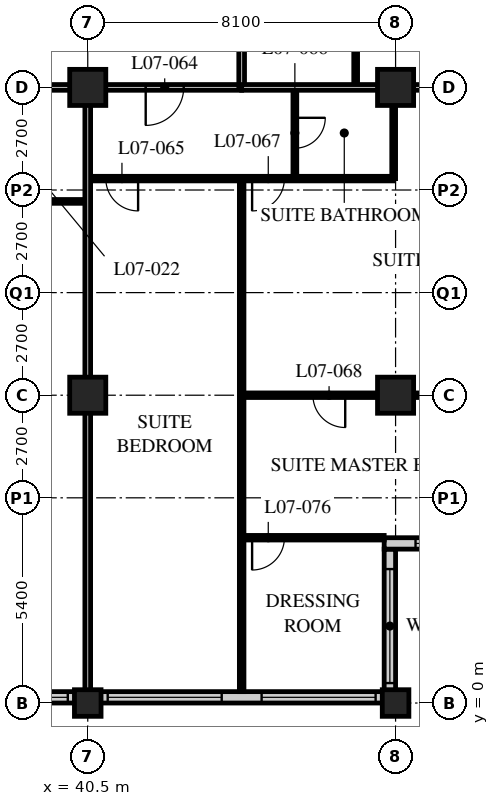
"""IFC4 building model, lengths in metres.
Left out: names, types, materials, properties, quantities, classifications, styles, units other than length and angle.
Written with IfcOpenShell. Run it as: python <this file> out.ifc"""

import sys

from ifc_helpers import new_model, si_unit, direction, frame, frame_2d, origin, origin_2d, place, context, subcontext, project, spatial, rectangle, hollow_rectangle, extrude, element, fill, save


model = new_model("IFC4")
c1 = context("Model", 3, precision=1e-05, world=origin(), true_north=direction((0.0, 1.0)))
c2 = subcontext(c1, "Body", "Model", "MODEL_VIEW")
j1 = project(units=[si_unit("LENGTHUNIT", "METRE"), si_unit("PLANEANGLEUNIT", "RADIAN")], contexts=[c1])
p1 = place(None, origin())
s1 = spatial("IfcSite", under=j1, at=p1, CompositionType="ELEMENT")
p2 = place(p1, origin())
s2 = spatial("IfcBuilding", under=s1, at=p2, CompositionType="ELEMENT")
p3 = place(p2, frame((0.0, 0.0, 36.4)))
s3 = spatial("IfcBuildingStorey", under=s2, at=p3, CompositionType="ELEMENT", Elevation=36.4)
p4 = place(p3, frame((40.5, 0.0, 0.0), z_axis=(0.0, 0.0, 1.0), x_axis=(1.0, 0.0, 0.0)))
e1 = element("IfcColumn", 1, at=p4, inside=s3, PredefinedType="COLUMN", context=c2, shape_type="SweptSolid", body=[
    extrude(hollow_rectangle(XDim=0.7, YDim=0.7, WallThickness=0.06, at=origin_2d()), origin(), (0.0, 0.0, 1.0), 3.4),
])
for number, where, z_axis, x_axis in (
    (2, (40.5, 8.1, 0.0), (0.0, 0.0, 1.0), (1.0, 0.0, 0.0)),
    (3, (40.5, 16.2, 0.0), (0.0, 0.0, 1.0), (1.0, 0.0, 0.0)),
):
    element("IfcColumn", number, at=place(p3, frame(where, z_axis=z_axis, x_axis=x_axis)), inside=s3, PredefinedType="COLUMN", context=c2, shape_type="SweptSolid", body=[
        extrude(hollow_rectangle(XDim=0.95, YDim=0.95, WallThickness=0.095, at=origin_2d()), origin(), (0.0, 0.0, 1.0), 3.4),
    ])
p5 = place(p3, frame((48.6, 0.0, 0.0), z_axis=(0.0, 0.0, 1.0), x_axis=(1.0, 0.0, 0.0)))
e4 = element("IfcColumn", 4, at=p5, inside=s3, PredefinedType="COLUMN", context=c2, shape_type="SweptSolid", body=[
    extrude(hollow_rectangle(XDim=0.7, YDim=0.7, WallThickness=0.06, at=origin_2d()), origin(), (0.0, 0.0, 1.0), 3.4),
])
for number, where, z_axis, x_axis in (
    (5, (48.6, 8.1, 0.0), (0.0, 0.0, 1.0), (1.0, 0.0, 0.0)),
    (6, (48.6, 16.2, 0.0), (0.0, 0.0, 1.0), (1.0, 0.0, 0.0)),
):
    element("IfcColumn", number, at=place(p3, frame(where, z_axis=z_axis, x_axis=x_axis)), inside=s3, PredefinedType="COLUMN", context=c2, shape_type="SweptSolid", body=[
        extrude(hollow_rectangle(XDim=0.95, YDim=0.95, WallThickness=0.095, at=origin_2d()), origin(), (0.0, 0.0, 1.0), 3.4),
    ])
p6 = place(p3, frame((8.4, 0.15, 0.0), z_axis=(0.0, 0.0, 1.0), x_axis=(1.0, 0.0, 0.0)))
e7 = element("IfcWall", 7, at=p6, inside=s3, PredefinedType="SOLIDWALL", context=c2, shape_type="SweptSolid", body=[
    extrude(rectangle(XDim=40.2, YDim=0.3, at=frame_2d((20.1, 0.0))), origin(), (0.0, 0.0, 1.0), 3.19),
])
p7 = place(p6, frame((0.225, 0.0, 0.9)))
e8 = element("IfcOpeningElement", 8, at=p7, cuts=e7, PredefinedType="OPENING", context=c2, shape_type="SweptSolid", body=[
    extrude(rectangle(XDim=3.0, YDim=2.0, at=frame_2d((1.5, 1.0))), frame((0.0, 0.16, 0.0), z_axis=(0.0, -1.0, 0.0), x_axis=(1.0, 0.0, 0.0)), (0.0, 0.0, 1.0), 0.32),
])
p8 = place(p6, frame((4.275, 0.0, 0.9)))
e9 = element("IfcOpeningElement", 9, at=p8, cuts=e7, PredefinedType="OPENING", context=c2, shape_type="SweptSolid", body=[
    extrude(rectangle(XDim=3.0, YDim=2.0, at=frame_2d((1.5, 1.0))), frame((0.0, 0.16, 0.0), z_axis=(0.0, -1.0, 0.0), x_axis=(1.0, 0.0, 0.0)), (0.0, 0.0, 1.0), 0.32),
])
p9 = place(p6, frame((8.325, 0.0, 0.9)))
e10 = element("IfcOpeningElement", 10, at=p9, cuts=e7, PredefinedType="OPENING", context=c2, shape_type="SweptSolid", body=[
    extrude(rectangle(XDim=3.0, YDim=2.0, at=frame_2d((1.5, 1.0))), frame((0.0, 0.16, 0.0), z_axis=(0.0, -1.0, 0.0), x_axis=(1.0, 0.0, 0.0)), (0.0, 0.0, 1.0), 0.32),
])
p10 = place(p6, frame((12.375, 0.0, 0.9)))
e11 = element("IfcOpeningElement", 11, at=p10, cuts=e7, PredefinedType="OPENING", context=c2, shape_type="SweptSolid", body=[
    extrude(rectangle(XDim=3.0, YDim=2.0, at=frame_2d((1.5, 1.0))), frame((0.0, 0.16, 0.0), z_axis=(0.0, -1.0, 0.0), x_axis=(1.0, 0.0, 0.0)), (0.0, 0.0, 1.0), 0.32),
])
p11 = place(p6, frame((16.425, 0.0, 0.9)))
e12 = element("IfcOpeningElement", 12, at=p11, cuts=e7, PredefinedType="OPENING", context=c2, shape_type="SweptSolid", body=[
    extrude(rectangle(XDim=3.0, YDim=2.0, at=frame_2d((1.5, 1.0))), frame((0.0, 0.16, 0.0), z_axis=(0.0, -1.0, 0.0), x_axis=(1.0, 0.0, 0.0)), (0.0, 0.0, 1.0), 0.32),
])
p12 = place(p6, frame((20.475, 0.0, 0.9)))
e13 = element("IfcOpeningElement", 13, at=p12, cuts=e7, PredefinedType="OPENING", context=c2, shape_type="SweptSolid", body=[
    extrude(rectangle(XDim=3.0, YDim=2.0, at=frame_2d((1.5, 1.0))), frame((0.0, 0.16, 0.0), z_axis=(0.0, -1.0, 0.0), x_axis=(1.0, 0.0, 0.0)), (0.0, 0.0, 1.0), 0.32),
])
p13 = place(p6, frame((24.525, 0.0, 0.9)))
e14 = element("IfcOpeningElement", 14, at=p13, cuts=e7, PredefinedType="OPENING", context=c2, shape_type="SweptSolid", body=[
    extrude(rectangle(XDim=3.0, YDim=2.0, at=frame_2d((1.5, 1.0))), frame((0.0, 0.16, 0.0), z_axis=(0.0, -1.0, 0.0), x_axis=(1.0, 0.0, 0.0)), (0.0, 0.0, 1.0), 0.32),
])
p14 = place(p6, frame((28.575, 0.0, 0.9)))
e15 = element("IfcOpeningElement", 15, at=p14, cuts=e7, PredefinedType="OPENING", context=c2, shape_type="SweptSolid", body=[
    extrude(rectangle(XDim=3.0, YDim=2.0, at=frame_2d((1.5, 1.0))), frame((0.0, 0.16, 0.0), z_axis=(0.0, -1.0, 0.0), x_axis=(1.0, 0.0, 0.0)), (0.0, 0.0, 1.0), 0.32),
])
p15 = place(p6, frame((32.625, 0.0, 0.9)))
e16 = element("IfcOpeningElement", 16, at=p15, cuts=e7, PredefinedType="OPENING", context=c2, shape_type="SweptSolid", body=[
    extrude(rectangle(XDim=3.0, YDim=2.0, at=frame_2d((1.5, 1.0))), frame((0.0, 0.16, 0.0), z_axis=(0.0, -1.0, 0.0), x_axis=(1.0, 0.0, 0.0)), (0.0, 0.0, 1.0), 0.32),
])
p16 = place(p6, frame((36.675, 0.0, 0.9)))
e17 = element("IfcOpeningElement", 17, at=p16, cuts=e7, PredefinedType="OPENING", context=c2, shape_type="SweptSolid", body=[
    extrude(rectangle(XDim=3.0, YDim=2.0, at=frame_2d((1.5, 1.0))), frame((0.0, 0.16, 0.0), z_axis=(0.0, -1.0, 0.0), x_axis=(1.0, 0.0, 0.0)), (0.0, 0.0, 1.0), 0.32),
])
p17 = place(p3, frame((48.45, 0.3, 0.0), z_axis=(0.0, 0.0, 1.0), x_axis=(0.0, 1.0, 0.0)))
e18 = element("IfcWall", 18, at=p17, inside=s3, PredefinedType="SOLIDWALL", context=c2, shape_type="SweptSolid", body=[
    extrude(rectangle(XDim=3.75, YDim=0.3, at=frame_2d((1.875, 0.0))), origin(), (0.0, 0.0, 1.0), 3.19),
])
p18 = place(p17, frame((0.225, 0.0, 0.9)))
e19 = element("IfcOpeningElement", 19, at=p18, cuts=e18, PredefinedType="OPENING", context=c2, shape_type="SweptSolid", body=[
    extrude(rectangle(XDim=3.0, YDim=1.5, at=frame_2d((1.5, 0.75))), frame((0.0, 0.16, 0.0), z_axis=(0.0, -1.0, 0.0), x_axis=(1.0, 0.0, 0.0)), (0.0, 0.0, 1.0), 0.32),
])
p19 = place(p3, frame((48.3, 4.2, 0.0), z_axis=(0.0, 0.0, 1.0), x_axis=(1.0, 0.0, 0.0)))
e20 = element("IfcWall", 20, at=p19, inside=s3, PredefinedType="SOLIDWALL", context=c2, shape_type="SweptSolid", body=[
    extrude(rectangle(XDim=4.35, YDim=0.3, at=frame_2d((2.175, 0.0))), origin(), (0.0, 0.0, 1.0), 3.19),
])
p20 = place(p19, frame((0.825, 0.0, 0.9)))
e21 = element("IfcOpeningElement", 21, at=p20, cuts=e20, PredefinedType="OPENING", context=c2, shape_type="SweptSolid", body=[
    extrude(rectangle(XDim=3.0, YDim=1.5, at=frame_2d((1.5, 0.75))), frame((0.0, 0.16, 0.0), z_axis=(0.0, -1.0, 0.0), x_axis=(1.0, 0.0, 0.0)), (0.0, 0.0, 1.0), 0.32),
])
p21 = place(p3, frame((12.15, 16.2, 0.0), z_axis=(0.0, 0.0, 1.0), x_axis=(1.0, 0.0, 0.0)))
e22 = element("IfcWall", 22, at=p21, inside=s3, PredefinedType="PARTITIONING", context=c2, shape_type="SweptSolid", body=[
    extrude(rectangle(XDim=32.4, YDim=0.15, at=frame_2d((16.2, 0.0))), origin(), (0.0, 0.0, 1.0), 2.578),
])
p22 = place(p21, frame((6.5, 0.0, 0.0)))
e23 = element("IfcOpeningElement", 23, at=p22, cuts=e22, PredefinedType="OPENING", context=c2, shape_type="SweptSolid", body=[
    extrude(rectangle(XDim=1.0, YDim=2.1, at=frame_2d((0.5, 1.05))), frame((0.0, 0.085, 0.0), z_axis=(0.0, -1.0, 0.0), x_axis=(1.0, 0.0, 0.0)), (0.0, 0.0, 1.0), 0.17),
])
p23 = place(p21, frame((8.4, 0.0, 0.0)))
e24 = element("IfcOpeningElement", 24, at=p23, cuts=e22, PredefinedType="OPENING", context=c2, shape_type="SweptSolid", body=[
    extrude(rectangle(XDim=1.0, YDim=2.1, at=frame_2d((0.5, 1.05))), frame((0.0, 0.085, 0.0), z_axis=(0.0, -1.0, 0.0), x_axis=(1.0, 0.0, 0.0)), (0.0, 0.0, 1.0), 0.17),
])
p24 = place(p21, frame((14.6, 0.0, 0.0)))
e25 = element("IfcOpeningElement", 25, at=p24, cuts=e22, PredefinedType="OPENING", context=c2, shape_type="SweptSolid", body=[
    extrude(rectangle(XDim=1.0, YDim=2.1, at=frame_2d((0.5, 1.05))), frame((0.0, 0.085, 0.0), z_axis=(0.0, -1.0, 0.0), x_axis=(1.0, 0.0, 0.0)), (0.0, 0.0, 1.0), 0.17),
])
p25 = place(p21, frame((16.5, 0.0, 0.0)))
e26 = element("IfcOpeningElement", 26, at=p25, cuts=e22, PredefinedType="OPENING", context=c2, shape_type="SweptSolid", body=[
    extrude(rectangle(XDim=1.0, YDim=2.1, at=frame_2d((0.5, 1.05))), frame((0.0, 0.085, 0.0), z_axis=(0.0, -1.0, 0.0), x_axis=(1.0, 0.0, 0.0)), (0.0, 0.0, 1.0), 0.17),
])
p26 = place(p21, frame((23.0, 0.0, 0.0)))
e27 = element("IfcOpeningElement", 27, at=p26, cuts=e22, PredefinedType="OPENING", context=c2, shape_type="SweptSolid", body=[
    extrude(rectangle(XDim=1.0, YDim=2.1, at=frame_2d((0.5, 1.05))), frame((0.0, 0.085, 0.0), z_axis=(0.0, -1.0, 0.0), x_axis=(1.0, 0.0, 0.0)), (0.0, 0.0, 1.0), 0.17),
])
p27 = place(p21, frame((24.6, 0.0, 0.0)))
e28 = element("IfcOpeningElement", 28, at=p27, cuts=e22, PredefinedType="OPENING", context=c2, shape_type="SweptSolid", body=[
    extrude(rectangle(XDim=1.0, YDim=2.1, at=frame_2d((0.5, 1.05))), frame((0.0, 0.085, 0.0), z_axis=(0.0, -1.0, 0.0), x_axis=(1.0, 0.0, 0.0)), (0.0, 0.0, 1.0), 0.17),
])
p28 = place(p21, frame((1.525, 0.0, 0.0)))
e29 = element("IfcOpeningElement", 29, at=p28, cuts=e22, PredefinedType="OPENING", context=c2, shape_type="SweptSolid", body=[
    extrude(rectangle(XDim=1.0, YDim=2.1, at=frame_2d((0.5, 1.05))), frame((0.0, 0.085, 0.0), z_axis=(0.0, -1.0, 0.0), x_axis=(1.0, 0.0, 0.0)), (0.0, 0.0, 1.0), 0.17),
])
p29 = place(p21, frame((29.875, 0.0, 0.0)))
e30 = element("IfcOpeningElement", 30, at=p29, cuts=e22, PredefinedType="OPENING", context=c2, shape_type="SweptSolid", body=[
    extrude(rectangle(XDim=1.0, YDim=2.1, at=frame_2d((0.5, 1.05))), frame((0.0, 0.085, 0.0), z_axis=(0.0, -1.0, 0.0), x_axis=(1.0, 0.0, 0.0)), (0.0, 0.0, 1.0), 0.17),
])
p30 = place(p3, frame((44.55, 16.2, 0.0), z_axis=(0.0, 0.0, 1.0), x_axis=(0.0, 1.0, 0.0)))
e31 = element("IfcWall", 31, at=p30, inside=s3, PredefinedType="PARTITIONING", context=c2, shape_type="SweptSolid", body=[
    extrude(rectangle(XDim=26.1, YDim=0.15, at=frame_2d((13.05, 0.0))), origin(), (0.0, 0.0, 1.0), 3.19),
])
p31 = place(p30, frame((2.75, 0.0, 0.0)))
e32 = element("IfcOpeningElement", 32, at=p31, cuts=e31, PredefinedType="OPENING", context=c2, shape_type="SweptSolid", body=[
    extrude(rectangle(XDim=1.0, YDim=2.1, at=frame_2d((0.5, 1.05))), frame((0.0, 0.085, 0.0), z_axis=(0.0, -1.0, 0.0), x_axis=(1.0, 0.0, 0.0)), (0.0, 0.0, 1.0), 0.17),
])
p32 = place(p30, frame((4.35, 0.0, 0.0)))
e33 = element("IfcOpeningElement", 33, at=p32, cuts=e31, PredefinedType="OPENING", context=c2, shape_type="SweptSolid", body=[
    extrude(rectangle(XDim=1.0, YDim=2.1, at=frame_2d((0.5, 1.05))), frame((0.0, 0.085, 0.0), z_axis=(0.0, -1.0, 0.0), x_axis=(1.0, 0.0, 0.0)), (0.0, 0.0, 1.0), 0.17),
])
p33 = place(p30, frame((8.4, 0.0, 0.0)))
e34 = element("IfcOpeningElement", 34, at=p33, cuts=e31, PredefinedType="OPENING", context=c2, shape_type="SweptSolid", body=[
    extrude(rectangle(XDim=1.0, YDim=2.1, at=frame_2d((0.5, 1.05))), frame((0.0, 0.085, 0.0), z_axis=(0.0, -1.0, 0.0), x_axis=(1.0, 0.0, 0.0)), (0.0, 0.0, 1.0), 0.17),
])
p34 = place(p30, frame((14.6, 0.0, 0.0)))
e35 = element("IfcOpeningElement", 35, at=p34, cuts=e31, PredefinedType="OPENING", context=c2, shape_type="SweptSolid", body=[
    extrude(rectangle(XDim=1.0, YDim=2.1, at=frame_2d((0.5, 1.05))), frame((0.0, 0.085, 0.0), z_axis=(0.0, -1.0, 0.0), x_axis=(1.0, 0.0, 0.0)), (0.0, 0.0, 1.0), 0.17),
])
p35 = place(p30, frame((18.65, 0.0, 0.0)))
e36 = element("IfcOpeningElement", 36, at=p35, cuts=e31, PredefinedType="OPENING", context=c2, shape_type="SweptSolid", body=[
    extrude(rectangle(XDim=1.0, YDim=2.1, at=frame_2d((0.5, 1.05))), frame((0.0, 0.085, 0.0), z_axis=(0.0, -1.0, 0.0), x_axis=(1.0, 0.0, 0.0)), (0.0, 0.0, 1.0), 0.17),
])
p36 = place(p30, frame((22.65, 0.0, 0.0)))
e37 = element("IfcOpeningElement", 37, at=p36, cuts=e31, PredefinedType="OPENING", context=c2, shape_type="SweptSolid", body=[
    extrude(rectangle(XDim=1.0, YDim=2.1, at=frame_2d((0.5, 1.05))), frame((0.0, 0.085, 0.0), z_axis=(0.0, -1.0, 0.0), x_axis=(1.0, 0.0, 0.0)), (0.0, 0.0, 1.0), 0.17),
])
for number, where, z_axis, x_axis in (
    (38, (37.9, 13.2, 0.0), (0.0, 0.0, 1.0), (1.0, 0.0, 0.0)),
    (39, (47.55, 16.2, 0.0), (0.0, 0.0, 1.0), (0.0, 1.0, 0.0)),
):
    element("IfcWall", number, at=place(p3, frame(where, z_axis=z_axis, x_axis=x_axis)), inside=s3, PredefinedType="PARTITIONING", context=c2, shape_type="SweptSolid", body=[
        extrude(rectangle(XDim=2.6, YDim=0.1, at=frame_2d((1.3, 0.0))), origin(), (0.0, 0.0, 1.0), 3.19),
    ])
p37 = place(p3, frame((40.5, 13.8, 0.0), z_axis=(0.0, 0.0, 1.0), x_axis=(1.0, 0.0, 0.0)))
e40 = element("IfcWall", 40, at=p37, inside=s3, PredefinedType="PARTITIONING", context=c2, shape_type="SweptSolid", body=[
    extrude(rectangle(XDim=8.05, YDim=0.12, at=frame_2d((4.025, 0.0))), origin(), (0.0, 0.0, 1.0), 3.19),
])
p38 = place(p37, frame((0.475, 0.0, 0.0)))
e41 = element("IfcOpeningElement", 41, at=p38, cuts=e40, PredefinedType="OPENING", context=c2, shape_type="SweptSolid", body=[
    extrude(rectangle(XDim=0.85, YDim=2.1, at=frame_2d((0.425, 1.05))), frame((0.0, 0.07, 0.0), z_axis=(0.0, -1.0, 0.0), x_axis=(1.0, 0.0, 0.0)), (0.0, 0.0, 1.0), 0.14),
])
p39 = place(p37, frame((4.325, 0.0, 0.0)))
e42 = element("IfcOpeningElement", 42, at=p39, cuts=e40, PredefinedType="OPENING", context=c2, shape_type="SweptSolid", body=[
    extrude(rectangle(XDim=0.85, YDim=2.1, at=frame_2d((0.425, 1.05))), frame((0.0, 0.07, 0.0), z_axis=(0.0, -1.0, 0.0), x_axis=(1.0, 0.0, 0.0)), (0.0, 0.0, 1.0), 0.14),
])
p40 = place(p3, frame((45.95, 16.2, 0.0), z_axis=(0.0, 0.0, 1.0), x_axis=(0.0, -1.0, 0.0)))
e43 = element("IfcWall", 43, at=p40, inside=s3, PredefinedType="PARTITIONING", context=c2, shape_type="SweptSolid", body=[
    extrude(rectangle(XDim=2.4, YDim=0.1, at=frame_2d((1.2, 0.0))), origin(), (0.0, 0.0, 1.0), 3.19),
])
p41 = place(p40, frame((0.8, 0.0, 0.0)))
e44 = element("IfcOpeningElement", 44, at=p41, cuts=e43, PredefinedType="OPENING", context=c2, shape_type="SweptSolid", body=[
    extrude(rectangle(XDim=0.8, YDim=2.1, at=frame_2d((0.4, 1.05))), frame((0.0, 0.06, 0.0), z_axis=(0.0, -1.0, 0.0), x_axis=(1.0, 0.0, 0.0)), (0.0, 0.0, 1.0), 0.12),
])
p42 = place(p3, frame((48.55, 16.2, 0.0), z_axis=(0.0, 0.0, 1.0), x_axis=(0.0, -1.0, 0.0)))
e45 = element("IfcWall", 45, at=p42, inside=s3, PredefinedType="PARTITIONING", context=c2, shape_type="SweptSolid", body=[
    extrude(rectangle(XDim=2.4, YDim=0.1, at=frame_2d((1.2, 0.0))), origin(), (0.0, 0.0, 1.0), 2.578),
])
p43 = place(p3, frame((44.55, 13.8, 0.0), z_axis=(0.0, 0.0, 1.0), x_axis=(0.0, -1.0, 0.0)))
e46 = element("IfcWall", 46, at=p43, inside=s3, PredefinedType="PARTITIONING", context=c2, shape_type="SweptSolid", body=[
    extrude(rectangle(XDim=13.5, YDim=0.12, at=frame_2d((6.75, 0.0))), origin(), (0.0, 0.0, 1.0), 3.19),
])
p44 = place(p3, frame((44.55, 8.1, 0.0), z_axis=(0.0, 0.0, 1.0), x_axis=(1.0, 0.0, 0.0)))
e47 = element("IfcWall", 47, at=p44, inside=s3, PredefinedType="PARTITIONING", context=c2, shape_type="SweptSolid", body=[
    extrude(rectangle(XDim=7.8, YDim=0.12, at=frame_2d((3.9, 0.0))), origin(), (0.0, 0.0, 1.0), 2.578),
])
p45 = place(p44, frame((1.875, 0.0, 0.0)))
e48 = element("IfcOpeningElement", 48, at=p45, cuts=e47, PredefinedType="OPENING", context=c2, shape_type="SweptSolid", body=[
    extrude(rectangle(XDim=0.85, YDim=2.1, at=frame_2d((0.425, 1.05))), frame((0.0, 0.07, 0.0), z_axis=(0.0, -1.0, 0.0), x_axis=(1.0, 0.0, 0.0)), (0.0, 0.0, 1.0), 0.14),
])
p46 = place(p3, frame((44.55, 16.2, 0.0), z_axis=(0.0, 0.0, 1.0), x_axis=(1.0, 0.0, 0.0)))
e49 = element("IfcWall", 49, at=p46, inside=s3, PredefinedType="PARTITIONING", context=c2, shape_type="SweptSolid", body=[
    extrude(rectangle(XDim=11.85, YDim=0.15, at=frame_2d((5.925, 0.0))), origin(), (0.0, 0.0, 1.0), 2.578),
])
p47 = place(p3, frame((40.5, 16.2, 0.0), z_axis=(0.0, 0.0, 1.0), x_axis=(0.0, -1.0, 0.0)))
e50 = element("IfcWall", 50, at=p47, inside=s3, PredefinedType="PARTITIONING", context=c2, shape_type="SweptSolid", body=[
    extrude(rectangle(XDim=15.9, YDim=0.15, at=frame_2d((7.95, 0.0))), origin(), (0.0, 0.0, 1.0), 2.578),
])
p48 = place(p3, frame((44.55, 4.35, 0.0), z_axis=(0.0, 0.0, 1.0), x_axis=(1.0, 0.0, 0.0)))
e51 = element("IfcWall", 51, at=p48, inside=s3, PredefinedType="PARTITIONING", context=c2, shape_type="SweptSolid", body=[
    extrude(rectangle(XDim=3.75, YDim=0.12, at=frame_2d((1.875, 0.0))), origin(), (0.0, 0.0, 1.0), 3.19),
])
p49 = place(p48, frame((0.275, 0.0, 0.0)))
e52 = element("IfcOpeningElement", 52, at=p49, cuts=e51, PredefinedType="OPENING", context=c2, shape_type="SweptSolid", body=[
    extrude(rectangle(XDim=0.85, YDim=2.1, at=frame_2d((0.425, 1.05))), frame((0.0, 0.07, 0.0), z_axis=(0.0, -1.0, 0.0), x_axis=(1.0, 0.0, 0.0)), (0.0, 0.0, 1.0), 0.14),
])
p50 = place(p14, origin())
e53 = element("IfcWindow", 53, at=p50, inside=s3, PartitioningType="SINGLE_PANEL", PredefinedType="WINDOW", context=c2, shape_type="SweptSolid", body=[
    extrude(rectangle(XDim=3.0, YDim=2.0, at=frame_2d((1.5, 1.0))), frame((0.0, 0.03, 0.0), z_axis=(0.0, -1.0, 0.0), x_axis=(1.0, 0.0, 0.0)), (0.0, 0.0, 1.0), 0.06),
])
fill(e15, e53)
p51 = place(p15, origin())
e54 = element("IfcWindow", 54, at=p51, inside=s3, PartitioningType="SINGLE_PANEL", PredefinedType="WINDOW", context=c2, shape_type="SweptSolid", body=[
    extrude(rectangle(XDim=3.0, YDim=2.0, at=frame_2d((1.5, 1.0))), frame((0.0, 0.03, 0.0), z_axis=(0.0, -1.0, 0.0), x_axis=(1.0, 0.0, 0.0)), (0.0, 0.0, 1.0), 0.06),
])
fill(e16, e54)
p52 = place(p16, origin())
e55 = element("IfcWindow", 55, at=p52, inside=s3, PartitioningType="SINGLE_PANEL", PredefinedType="WINDOW", context=c2, shape_type="SweptSolid", body=[
    extrude(rectangle(XDim=3.0, YDim=2.0, at=frame_2d((1.5, 1.0))), frame((0.0, 0.03, 0.0), z_axis=(0.0, -1.0, 0.0), x_axis=(1.0, 0.0, 0.0)), (0.0, 0.0, 1.0), 0.06),
])
fill(e17, e55)
p53 = place(p18, origin())
e56 = element("IfcWindow", 56, at=p53, inside=s3, PartitioningType="SINGLE_PANEL", PredefinedType="WINDOW", context=c2, shape_type="SweptSolid", body=[
    extrude(rectangle(XDim=3.0, YDim=1.5, at=frame_2d((1.5, 0.75))), frame((0.0, 0.03, 0.0), z_axis=(0.0, -1.0, 0.0), x_axis=(1.0, 0.0, 0.0)), (0.0, 0.0, 1.0), 0.06),
])
fill(e19, e56)
p54 = place(p20, origin())
e57 = element("IfcWindow", 57, at=p54, inside=s3, PartitioningType="SINGLE_PANEL", PredefinedType="WINDOW", context=c2, shape_type="SweptSolid", body=[
    extrude(rectangle(XDim=3.0, YDim=1.5, at=frame_2d((1.5, 0.75))), frame((0.0, 0.03, 0.0), z_axis=(0.0, -1.0, 0.0), x_axis=(1.0, 0.0, 0.0)), (0.0, 0.0, 1.0), 0.06),
])
fill(e21, e57)
p55 = place(p29, origin())
e58 = element("IfcDoor", 58, at=p55, inside=s3, OperationType="SINGLE_SWING_RIGHT", PredefinedType="DOOR", context=c2, shape_type="SweptSolid", body=[
    extrude(rectangle(XDim=1.0, YDim=2.1, at=frame_2d((0.5, 1.05))), frame((0.0, 0.025, 0.0), z_axis=(0.0, -1.0, 0.0), x_axis=(1.0, 0.0, 0.0)), (0.0, 0.0, 1.0), 0.05),
])
fill(e30, e58)
p56 = place(p38, origin())
e59 = element("IfcDoor", 59, at=p56, inside=s3, OperationType="SINGLE_SWING_LEFT", PredefinedType="DOOR", context=c2, shape_type="SweptSolid", body=[
    extrude(rectangle(XDim=0.85, YDim=2.1, at=frame_2d((0.425, 1.05))), frame((0.0, 0.025, 0.0), z_axis=(0.0, -1.0, 0.0), x_axis=(1.0, 0.0, 0.0)), (0.0, 0.0, 1.0), 0.05),
])
fill(e41, e59)
p57 = place(p41, origin())
e60 = element("IfcDoor", 60, at=p57, inside=s3, OperationType="SINGLE_SWING_LEFT", PredefinedType="DOOR", context=c2, shape_type="SweptSolid", body=[
    extrude(rectangle(XDim=0.8, YDim=2.1, at=frame_2d((0.4, 1.05))), frame((0.0, 0.025, 0.0), z_axis=(0.0, -1.0, 0.0), x_axis=(1.0, 0.0, 0.0)), (0.0, 0.0, 1.0), 0.05),
])
fill(e44, e60)
p58 = place(p39, origin())
e61 = element("IfcDoor", 61, at=p58, inside=s3, OperationType="SINGLE_SWING_RIGHT", PredefinedType="DOOR", context=c2, shape_type="SweptSolid", body=[
    extrude(rectangle(XDim=0.85, YDim=2.1, at=frame_2d((0.425, 1.05))), frame((0.0, 0.025, 0.0), z_axis=(0.0, -1.0, 0.0), x_axis=(1.0, 0.0, 0.0)), (0.0, 0.0, 1.0), 0.05),
])
fill(e42, e61)
p59 = place(p45, origin())
e62 = element("IfcDoor", 62, at=p59, inside=s3, OperationType="SINGLE_SWING_LEFT", PredefinedType="DOOR", context=c2, shape_type="SweptSolid", body=[
    extrude(rectangle(XDim=0.85, YDim=2.1, at=frame_2d((0.425, 1.05))), frame((0.0, 0.025, 0.0), z_axis=(0.0, -1.0, 0.0), x_axis=(1.0, 0.0, 0.0)), (0.0, 0.0, 1.0), 0.05),
])
fill(e48, e62)
p60 = place(p49, origin())
e63 = element("IfcDoor", 63, at=p60, inside=s3, OperationType="SINGLE_SWING_RIGHT", PredefinedType="DOOR", context=c2, shape_type="SweptSolid", body=[
    extrude(rectangle(XDim=0.85, YDim=2.1, at=frame_2d((0.425, 1.05))), frame((0.0, 0.025, 0.0), z_axis=(0.0, -1.0, 0.0), x_axis=(1.0, 0.0, 0.0)), (0.0, 0.0, 1.0), 0.05),
])
fill(e52, e63)
save(model, sys.argv[1])
